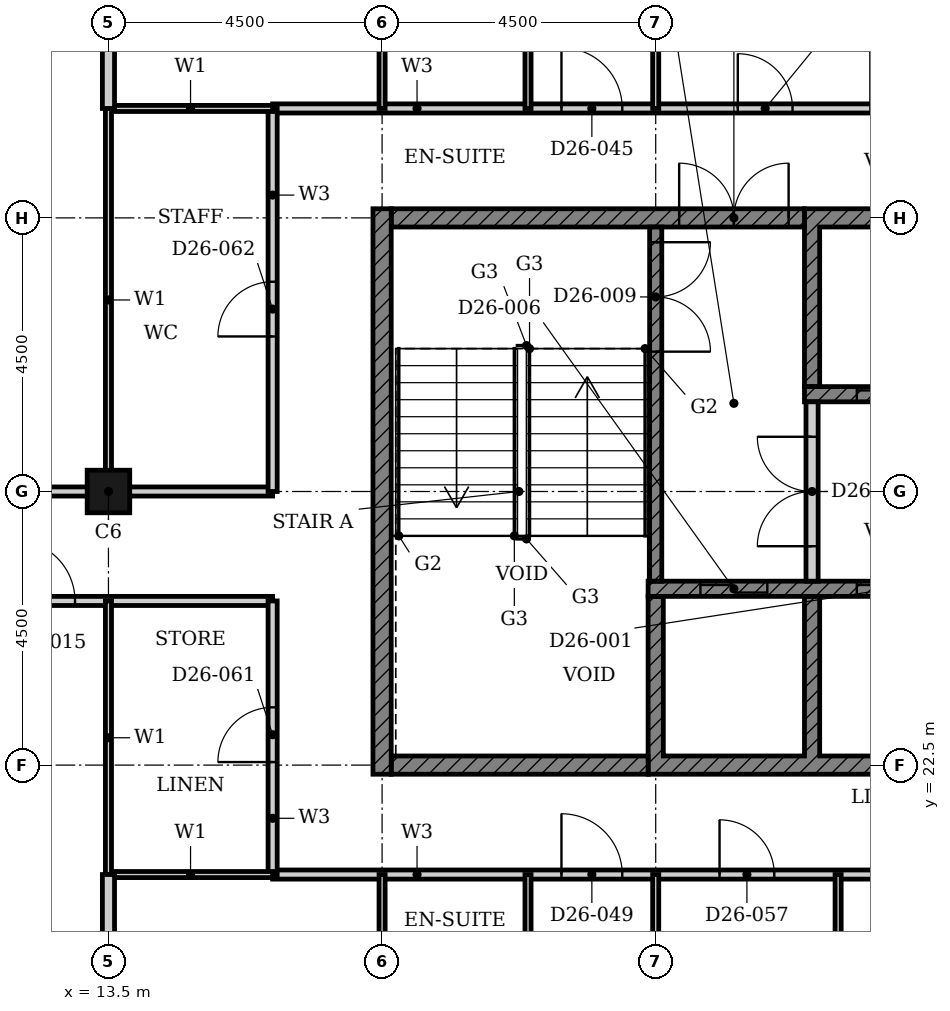
"""IFC4 building model, lengths in metres.
Left out: names, types, materials, properties, quantities, classifications, styles, units other than length and angle.
Written with IfcOpenShell. Run it as: python <this file> out.ifc"""

import sys

from ifc_helpers import new_model, si_unit, direction, frame, frame_2d, origin, origin_2d, place, context, subcontext, project, spatial, polyline, rectangle, hollow_rectangle, outline, extrude, element, fill, save


model = new_model("IFC4")
c1 = context("Model", 3, precision=1e-05, world=origin(), true_north=direction((0.0, 1.0)))
c2 = subcontext(c1, "Body", "Model", "MODEL_VIEW")
j1 = project(units=[si_unit("LENGTHUNIT", "METRE"), si_unit("PLANEANGLEUNIT", "RADIAN")], contexts=[c1])
p1 = place(None, origin())
s1 = spatial("IfcSite", under=j1, at=p1, CompositionType="ELEMENT")
p2 = place(p1, origin())
s2 = spatial("IfcBuilding", under=s1, at=p2, CompositionType="ELEMENT")
p3 = place(p2, frame((0.0, 0.0, 108.0)))
s3 = spatial("IfcBuildingStorey", under=s2, at=p3, CompositionType="ELEMENT", Elevation=108.0)
p4 = place(p3, frame((13.5, 27.0, 0.0), z_axis=(0.0, 0.0, 1.0), x_axis=(1.0, 0.0, 0.0)))
e1 = element("IfcColumn", 1, at=p4, inside=s3, PredefinedType="COLUMN", context=c2, shape_type="SweptSolid", body=[
    extrude(hollow_rectangle(XDim=0.7, YDim=0.7, WallThickness=0.022, at=origin_2d()), origin(), (0.0, 0.0, 1.0), 3.6),
])
p5 = place(p3, origin())
e2 = element("IfcWall", 2, at=p5, inside=s3, PredefinedType="SHEAR", context=c2, shape_type="SweptSolid", body=[
    extrude(outline(polyline([(22.375, 22.35), (38.053, 22.35), (38.053, 25.275), (37.803, 25.275), (37.803, 22.65), (35.482, 22.65), (35.482, 25.275), (35.232, 25.275), (35.232, 22.65), (32.911, 22.65), (32.911, 25.275), (32.661, 25.275), (32.661, 22.65), (30.339, 22.65), (30.339, 25.275), (30.089, 25.275), (30.089, 22.65), (27.768, 22.65), (27.768, 25.275), (27.518, 25.275), (27.518, 22.65), (25.197, 22.65), (25.197, 25.275), (24.947, 25.275), (24.947, 22.65), (22.625, 22.65), (22.625, 25.275), (22.375, 25.275), (22.375, 22.35)])), origin(), (0.0, 0.0, 1.0), 3.3),
])
p6 = place(p3, origin())
e3 = element("IfcWall", 3, at=p6, inside=s3, PredefinedType="SHEAR", context=c2, shape_type="SweptSolid", body=[
    extrude(outline(polyline([(24.947, 28.725), (25.197, 28.725), (25.197, 31.35), (27.518, 31.35), (27.518, 28.725), (27.768, 28.725), (27.768, 31.35), (30.089, 31.35), (30.089, 28.725), (30.339, 28.725), (30.339, 31.35), (32.661, 31.35), (32.661, 28.725), (32.911, 28.725), (32.911, 31.35), (35.232, 31.35), (35.232, 28.725), (35.482, 28.725), (35.482, 31.35), (37.803, 31.35), (37.803, 28.725), (38.053, 28.725), (38.053, 31.35), (40.375, 31.35), (40.375, 28.725), (40.625, 28.725), (40.625, 31.65), (24.947, 31.65), (24.947, 28.725)])), origin(), (0.0, 0.0, 1.0), 3.3),
])
p7 = place(p3, frame((18.15, 22.5, 0.0), z_axis=(0.0, 0.0, 1.0), x_axis=(1.0, 0.0, 0.0)))
e4 = element("IfcWall", 4, at=p7, inside=s3, PredefinedType="SHEAR", context=c2, shape_type="SweptSolid", body=[
    extrude(rectangle(XDim=4.225, YDim=0.3, at=frame_2d((2.113, 0.0))), origin(), (0.0, 0.0, 1.0), 3.3),
])
p8 = place(p3, frame((18.15, 31.5, 0.0), z_axis=(0.0, 0.0, 1.0), x_axis=(1.0, 0.0, 0.0)))
e5 = element("IfcWall", 5, at=p8, inside=s3, PredefinedType="SHEAR", context=c2, shape_type="SweptSolid", body=[
    extrude(rectangle(XDim=6.797, YDim=0.3, at=frame_2d((3.398, 0.0))), origin(), (0.0, 0.0, 1.0), 3.3),
])
p9 = place(p8, frame((4.736, 0.0, 0.0)))
e6 = element("IfcOpeningElement", 6, at=p9, cuts=e5, PredefinedType="OPENING", context=c2, shape_type="SweptSolid", body=[
    extrude(rectangle(XDim=1.8, YDim=2.1, at=frame_2d((0.9, 1.05))), frame((0.0, 0.16, 0.0), z_axis=(0.0, -1.0, 0.0), x_axis=(1.0, 0.0, 0.0)), (0.0, 0.0, 1.0), 0.32),
])
p10 = place(p3, frame((18.0, 22.35, 0.0), z_axis=(0.0, 0.0, 1.0), x_axis=(0.0, 1.0, 0.0)))
e7 = element("IfcWall", 7, at=p10, inside=s3, PredefinedType="SHEAR", context=c2, shape_type="SweptSolid", body=[
    extrude(rectangle(XDim=9.3, YDim=0.3, at=frame_2d((4.65, 0.0))), origin(), (0.0, 0.0, 1.0), 3.3),
])
p11 = place(p3, frame((22.375, 25.4, 0.0), z_axis=(0.0, 0.0, 1.0), x_axis=(1.0, 0.0, 0.0)))
e8 = element("IfcWall", 8, at=p11, inside=s3, PredefinedType="SHEAR", context=c2, shape_type="SweptSolid", body=[
    extrude(rectangle(XDim=15.678, YDim=0.25, at=frame_2d((7.839, 0.0))), origin(), (0.0, 0.0, 1.0), 3.3),
])
p12 = place(p11, frame((3.432, 0.0, 0.0)))
e9 = element("IfcOpeningElement", 9, at=p12, cuts=e8, PredefinedType="OPENING", context=c2, shape_type="SweptSolid", body=[
    extrude(rectangle(XDim=1.1, YDim=2.1, at=frame_2d((0.55, 1.05))), frame((0.0, 0.135, 0.0), z_axis=(0.0, -1.0, 0.0), x_axis=(1.0, 0.0, 0.0)), (0.0, 0.0, 1.0), 0.27),
])
p13 = place(p11, frame((11.146, 0.0, 0.0)))
e10 = element("IfcOpeningElement", 10, at=p13, cuts=e8, PredefinedType="OPENING", context=c2, shape_type="SweptSolid", body=[
    extrude(rectangle(XDim=1.1, YDim=2.1, at=frame_2d((0.55, 1.05))), frame((0.0, 0.135, 0.0), z_axis=(0.0, -1.0, 0.0), x_axis=(1.0, 0.0, 0.0)), (0.0, 0.0, 1.0), 0.27),
])
p14 = place(p11, frame((13.718, 0.0, 0.0)))
e11 = element("IfcOpeningElement", 11, at=p14, cuts=e8, PredefinedType="OPENING", context=c2, shape_type="SweptSolid", body=[
    extrude(rectangle(XDim=1.1, YDim=2.1, at=frame_2d((0.55, 1.05))), frame((0.0, 0.135, 0.0), z_axis=(0.0, -1.0, 0.0), x_axis=(1.0, 0.0, 0.0)), (0.0, 0.0, 1.0), 0.27),
])
p15 = place(p11, frame((0.861, 0.0, 0.0)))
e12 = element("IfcOpeningElement", 12, at=p15, cuts=e8, PredefinedType="OPENING", context=c2, shape_type="SweptSolid", body=[
    extrude(rectangle(XDim=1.1, YDim=2.1, at=frame_2d((0.55, 1.05))), frame((0.0, 0.135, 0.0), z_axis=(0.0, -1.0, 0.0), x_axis=(1.0, 0.0, 0.0)), (0.0, 0.0, 1.0), 0.27),
])
p16 = place(p3, frame((24.947, 28.6, 0.0), z_axis=(0.0, 0.0, 1.0), x_axis=(1.0, 0.0, 0.0)))
e13 = element("IfcWall", 13, at=p16, inside=s3, PredefinedType="SHEAR", context=c2, shape_type="SweptSolid", body=[
    extrude(rectangle(XDim=15.678, YDim=0.25, at=frame_2d((7.839, 0.0))), origin(), (0.0, 0.0, 1.0), 3.3),
])
p17 = place(p16, frame((0.861, 0.0, 0.0)))
e14 = element("IfcOpeningElement", 14, at=p17, cuts=e13, PredefinedType="OPENING", context=c2, shape_type="SweptSolid", body=[
    extrude(rectangle(XDim=1.1, YDim=2.1, at=frame_2d((0.55, 1.05))), frame((0.0, 0.135, 0.0), z_axis=(0.0, -1.0, 0.0), x_axis=(1.0, 0.0, 0.0)), (0.0, 0.0, 1.0), 0.27),
])
p18 = place(p16, frame((8.575, 0.0, 0.0)))
e15 = element("IfcOpeningElement", 15, at=p18, cuts=e13, PredefinedType="OPENING", context=c2, shape_type="SweptSolid", body=[
    extrude(rectangle(XDim=1.1, YDim=2.1, at=frame_2d((0.55, 1.05))), frame((0.0, 0.135, 0.0), z_axis=(0.0, -1.0, 0.0), x_axis=(1.0, 0.0, 0.0)), (0.0, 0.0, 1.0), 0.27),
])
p19 = place(p16, frame((13.718, 0.0, 0.0)))
e16 = element("IfcOpeningElement", 16, at=p19, cuts=e13, PredefinedType="OPENING", context=c2, shape_type="SweptSolid", body=[
    extrude(rectangle(XDim=1.1, YDim=2.1, at=frame_2d((0.55, 1.05))), frame((0.0, 0.135, 0.0), z_axis=(0.0, -1.0, 0.0), x_axis=(1.0, 0.0, 0.0)), (0.0, 0.0, 1.0), 0.27),
])
p20 = place(p3, frame((22.5, 31.35, 0.0), z_axis=(0.0, 0.0, 1.0), x_axis=(0.0, -1.0, 0.0)))
e17 = element("IfcWall", 17, at=p20, inside=s3, PredefinedType="SHEAR", context=c2, shape_type="SweptSolid", body=[
    extrude(rectangle(XDim=5.825, YDim=0.2, at=frame_2d((2.913, 0.0))), origin(), (0.0, 0.0, 1.0), 3.3),
])
p21 = place(p20, frame((0.25, 0.0, 0.0)))
e18 = element("IfcOpeningElement", 18, at=p21, cuts=e17, PredefinedType="OPENING", context=c2, shape_type="SweptSolid", body=[
    extrude(rectangle(XDim=1.8, YDim=2.1, at=frame_2d((0.9, 1.05))), frame((0.0, 0.11, 0.0), z_axis=(0.0, -1.0, 0.0), x_axis=(1.0, 0.0, 0.0)), (0.0, 0.0, 1.0), 0.22),
])
p22 = place(p3, frame((25.072, 25.525, 0.0), z_axis=(0.0, 0.0, 1.0), x_axis=(0.0, 1.0, 0.0)))
e19 = element("IfcWall", 19, at=p22, inside=s3, PredefinedType="PARTITIONING", context=c2, shape_type="SweptSolid", body=[
    extrude(rectangle(XDim=2.95, YDim=0.2, at=frame_2d((1.475, 0.0))), origin(), (0.0, 0.0, 1.0), 3.3),
])
p23 = place(p22, frame((0.575, 0.0, 0.0)))
e20 = element("IfcOpeningElement", 20, at=p23, cuts=e19, PredefinedType="OPENING", context=c2, shape_type="SweptSolid", body=[
    extrude(rectangle(XDim=1.8, YDim=2.1, at=frame_2d((0.9, 1.05))), frame((0.0, 0.11, 0.0), z_axis=(0.0, -1.0, 0.0), x_axis=(1.0, 0.0, 0.0)), (0.0, 0.0, 1.0), 0.22),
])
p24 = place(p3, frame((16.2, 20.7, 0.0), z_axis=(0.0, 0.0, 1.0), x_axis=(1.0, 0.0, 0.0)))
e21 = element("IfcWall", 21, at=p24, inside=s3, PredefinedType="PARTITIONING", context=c2, shape_type="SweptSolid", body=[
    extrude(rectangle(XDim=13.5, YDim=0.15, at=frame_2d((6.75, 0.0))), origin(), (0.0, 0.0, 1.0), 3.3),
])
p25 = place(p24, frame((4.75, 0.0, 0.0)))
e22 = element("IfcOpeningElement", 22, at=p25, cuts=e21, PredefinedType="OPENING", context=c2, shape_type="SweptSolid", body=[
    extrude(rectangle(XDim=1.0, YDim=2.1, at=frame_2d((0.5, 1.05))), frame((0.0, 0.085, 0.0), z_axis=(0.0, -1.0, 0.0), x_axis=(1.0, 0.0, 0.0)), (0.0, 0.0, 1.0), 0.17),
])
p26 = place(p24, frame((7.35, 0.0, 0.0)))
e23 = element("IfcOpeningElement", 23, at=p26, cuts=e21, PredefinedType="OPENING", context=c2, shape_type="SweptSolid", body=[
    extrude(rectangle(XDim=0.9, YDim=2.1, at=frame_2d((0.45, 1.05))), frame((0.0, 0.085, 0.0), z_axis=(0.0, -1.0, 0.0), x_axis=(1.0, 0.0, 0.0)), (0.0, 0.0, 1.0), 0.17),
])
p27 = place(p24, frame((10.95, 0.0, 0.0)))
e24 = element("IfcOpeningElement", 24, at=p27, cuts=e21, PredefinedType="OPENING", context=c2, shape_type="SweptSolid", body=[
    extrude(rectangle(XDim=0.9, YDim=2.1, at=frame_2d((0.45, 1.05))), frame((0.0, 0.085, 0.0), z_axis=(0.0, -1.0, 0.0), x_axis=(1.0, 0.0, 0.0)), (0.0, 0.0, 1.0), 0.17),
])
p28 = place(p3, frame((4.5, 25.2, 0.0), z_axis=(0.0, 0.0, 1.0), x_axis=(1.0, 0.0, 0.0)))
e25 = element("IfcWall", 25, at=p28, inside=s3, PredefinedType="PARTITIONING", context=c2, shape_type="SweptSolid", body=[
    extrude(rectangle(XDim=11.7, YDim=0.15, at=frame_2d((5.85, 0.0))), origin(), (0.0, 0.0, 1.0), 3.3),
])
p29 = place(p28, frame((7.45, 0.0, 0.0)))
e26 = element("IfcOpeningElement", 26, at=p29, cuts=e25, PredefinedType="OPENING", context=c2, shape_type="SweptSolid", body=[
    extrude(rectangle(XDim=1.0, YDim=2.1, at=frame_2d((0.5, 1.05))), frame((0.0, 0.085, 0.0), z_axis=(0.0, -1.0, 0.0), x_axis=(1.0, 0.0, 0.0)), (0.0, 0.0, 1.0), 0.17),
])
p30 = place(p28, frame((2.95, 0.0, 0.0)))
e27 = element("IfcOpeningElement", 27, at=p30, cuts=e25, PredefinedType="OPENING", context=c2, shape_type="SweptSolid", body=[
    extrude(rectangle(XDim=1.0, YDim=2.1, at=frame_2d((0.5, 1.05))), frame((0.0, 0.085, 0.0), z_axis=(0.0, -1.0, 0.0), x_axis=(1.0, 0.0, 0.0)), (0.0, 0.0, 1.0), 0.17),
])
p31 = place(p3, frame((4.5, 27.0, 0.0), z_axis=(0.0, 0.0, 1.0), x_axis=(1.0, 0.0, 0.0)))
e28 = element("IfcWall", 28, at=p31, inside=s3, PredefinedType="PARTITIONING", context=c2, shape_type="SweptSolid", body=[
    extrude(rectangle(XDim=11.7, YDim=0.15, at=frame_2d((5.85, 0.0))), origin(), (0.0, 0.0, 1.0), 2.58),
])
p32 = place(p31, frame((6.25, 0.0, 0.0)))
e29 = element("IfcOpeningElement", 29, at=p32, cuts=e28, PredefinedType="OPENING", context=c2, shape_type="SweptSolid", body=[
    extrude(rectangle(XDim=1.0, YDim=2.1, at=frame_2d((0.5, 1.05))), frame((0.0, 0.085, 0.0), z_axis=(0.0, -1.0, 0.0), x_axis=(1.0, 0.0, 0.0)), (0.0, 0.0, 1.0), 0.17),
])
p33 = place(p3, frame((16.2, 33.3, 0.0), z_axis=(0.0, 0.0, 1.0), x_axis=(1.0, 0.0, 0.0)))
e30 = element("IfcWall", 30, at=p33, inside=s3, PredefinedType="PARTITIONING", context=c2, shape_type="SweptSolid", body=[
    extrude(rectangle(XDim=15.3, YDim=0.15, at=frame_2d((7.65, 0.0))), origin(), (0.0, 0.0, 1.0), 3.3),
])
p34 = place(p33, frame((4.75, 0.0, 0.0)))
e31 = element("IfcOpeningElement", 31, at=p34, cuts=e30, PredefinedType="OPENING", context=c2, shape_type="SweptSolid", body=[
    extrude(rectangle(XDim=1.0, YDim=2.1, at=frame_2d((0.5, 1.05))), frame((0.0, 0.085, 0.0), z_axis=(0.0, -1.0, 0.0), x_axis=(1.0, 0.0, 0.0)), (0.0, 0.0, 1.0), 0.17),
])
p35 = place(p33, frame((7.65, 0.0, 0.0)))
e32 = element("IfcOpeningElement", 32, at=p35, cuts=e30, PredefinedType="OPENING", context=c2, shape_type="SweptSolid", body=[
    extrude(rectangle(XDim=0.9, YDim=2.1, at=frame_2d((0.45, 1.05))), frame((0.0, 0.085, 0.0), z_axis=(0.0, -1.0, 0.0), x_axis=(1.0, 0.0, 0.0)), (0.0, 0.0, 1.0), 0.17),
])
p36 = place(p33, frame((12.15, 0.0, 0.0)))
e33 = element("IfcOpeningElement", 33, at=p36, cuts=e30, PredefinedType="OPENING", context=c2, shape_type="SweptSolid", body=[
    extrude(rectangle(XDim=0.9, YDim=2.1, at=frame_2d((0.45, 1.05))), frame((0.0, 0.085, 0.0), z_axis=(0.0, -1.0, 0.0), x_axis=(1.0, 0.0, 0.0)), (0.0, 0.0, 1.0), 0.17),
])
p37 = place(p3, frame((16.2, 27.0, 0.0), z_axis=(0.0, 0.0, 1.0), x_axis=(0.0, 1.0, 0.0)))
e34 = element("IfcWall", 34, at=p37, inside=s3, PredefinedType="PARTITIONING", context=c2, shape_type="SweptSolid", body=[
    extrude(rectangle(XDim=6.3, YDim=0.15, at=frame_2d((3.15, 0.0))), origin(), (0.0, 0.0, 1.0), 3.3),
])
p38 = place(p37, frame((2.55, 0.0, 0.0)))
e35 = element("IfcOpeningElement", 35, at=p38, cuts=e34, PredefinedType="OPENING", context=c2, shape_type="SweptSolid", body=[
    extrude(rectangle(XDim=0.9, YDim=2.1, at=frame_2d((0.45, 1.05))), frame((0.0, 0.085, 0.0), z_axis=(0.0, -1.0, 0.0), x_axis=(1.0, 0.0, 0.0)), (0.0, 0.0, 1.0), 0.17),
])
p39 = place(p3, frame((16.2, 20.7, 0.0), z_axis=(0.0, 0.0, 1.0), x_axis=(0.0, 1.0, 0.0)))
e36 = element("IfcWall", 36, at=p39, inside=s3, PredefinedType="PARTITIONING", context=c2, shape_type="SweptSolid", body=[
    extrude(rectangle(XDim=4.5, YDim=0.15, at=frame_2d((2.25, 0.0))), origin(), (0.0, 0.0, 1.0), 3.3),
])
p40 = place(p39, frame((1.85, 0.0, 0.0)))
e37 = element("IfcOpeningElement", 37, at=p40, cuts=e36, PredefinedType="OPENING", context=c2, shape_type="SweptSolid", body=[
    extrude(rectangle(XDim=0.9, YDim=2.1, at=frame_2d((0.45, 1.05))), frame((0.0, 0.085, 0.0), z_axis=(0.0, -1.0, 0.0), x_axis=(1.0, 0.0, 0.0)), (0.0, 0.0, 1.0), 0.17),
])
for number, where, z_axis, x_axis in (
    (38, (13.5, 20.7, 0.0), (0.0, 0.0, 1.0), (1.0, 0.0, 0.0)),
    (39, (13.5, 33.3, 0.0), (0.0, 0.0, 1.0), (1.0, 0.0, 0.0)),
):
    element("IfcWall", number, at=place(p3, frame(where, z_axis=z_axis, x_axis=x_axis)), inside=s3, PredefinedType="PARTITIONING", context=c2, shape_type="SweptSolid", body=[
        extrude(rectangle(XDim=2.7, YDim=0.1, at=frame_2d((1.35, 0.0))), origin(), (0.0, 0.0, 1.0), 3.3),
    ])
p41 = place(p3, frame((13.5, 20.7, 0.0), z_axis=(0.0, 0.0, 1.0), x_axis=(0.0, 1.0, 0.0)))
e40 = element("IfcWall", 40, at=p41, inside=s3, PredefinedType="PARTITIONING", context=c2, shape_type="SweptSolid", body=[
    extrude(rectangle(XDim=4.5, YDim=0.1, at=frame_2d((2.25, 0.0))), origin(), (0.0, 0.0, 1.0), 2.38),
])
p42 = place(p3, frame((13.5, 27.0, 0.0), z_axis=(0.0, 0.0, 1.0), x_axis=(0.0, 1.0, 0.0)))
e41 = element("IfcWall", 41, at=p42, inside=s3, PredefinedType="PARTITIONING", context=c2, shape_type="SweptSolid", body=[
    extrude(rectangle(XDim=6.3, YDim=0.1, at=frame_2d((3.15, 0.0))), origin(), (0.0, 0.0, 1.0), 2.38),
])
for number, where, z_axis, x_axis in (
    (42, (22.5, 33.3, 0.0), (0.0, 0.0, 1.0), (0.0, 1.0, 0.0)),
    (43, (22.5, 13.31, 0.0), (0.0, 0.0, 1.0), (0.0, 1.0, 0.0)),
):
    element("IfcWall", number, at=place(p3, frame(where, z_axis=z_axis, x_axis=x_axis)), inside=s3, PredefinedType="PARTITIONING", context=c2, shape_type="SweptSolid", body=[
        extrude(rectangle(XDim=7.39, YDim=0.1, at=frame_2d((3.695, 0.0))), origin(), (0.0, 0.0, 1.0), 3.3),
    ])
p43 = place(p3, frame((25.5, 13.5, 0.0), z_axis=(0.0, 0.0, 1.0), x_axis=(0.0, 1.0, 0.0)))
e44 = element("IfcWall", 44, at=p43, inside=s3, PredefinedType="PARTITIONING", context=c2, shape_type="SweptSolid", body=[
    extrude(rectangle(XDim=7.2, YDim=0.1, at=frame_2d((3.6, 0.0))), origin(), (0.0, 0.0, 1.0), 3.3),
])
for number, where, z_axis, x_axis in (
    (45, (13.5, 17.81, 0.0), (0.0, 0.0, 1.0), (0.0, 1.0, 0.0)),
    (46, (13.5, 33.3, 0.0), (0.0, 0.0, 1.0), (0.0, 1.0, 0.0)),
):
    element("IfcWall", number, at=place(p3, frame(where, z_axis=z_axis, x_axis=x_axis)), inside=s3, PredefinedType="PARTITIONING", context=c2, shape_type="SweptSolid", body=[
        extrude(rectangle(XDim=2.89, YDim=0.2, at=frame_2d((1.445, 0.0))), origin(), (0.0, 0.0, 1.0), 2.38),
    ])
for number, where, z_axis, x_axis in (
    (47, (18.0, 33.3, 0.0), (0.0, 0.0, 1.0), (0.0, 1.0, 0.0)),
    (48, (18.0, 18.0, 0.0), (0.0, 0.0, 1.0), (0.0, 1.0, 0.0)),
    (49, (20.4, 33.3, 0.0), (0.0, 0.0, 1.0), (0.0, 1.0, 0.0)),
    (50, (20.4, 18.0, 0.0), (0.0, 0.0, 1.0), (0.0, 1.0, 0.0)),
):
    element("IfcWall", number, at=place(p3, frame(where, z_axis=z_axis, x_axis=x_axis)), inside=s3, PredefinedType="PARTITIONING", context=c2, shape_type="SweptSolid", body=[
        extrude(rectangle(XDim=2.7, YDim=0.1, at=frame_2d((1.35, 0.0))), origin(), (0.0, 0.0, 1.0), 3.3),
    ])
p44 = place(p12, origin())
e51 = element("IfcDoor", 51, at=p44, inside=s3, OperationType="DOUBLE_DOOR_SLIDING", PredefinedType="DOOR", context=c2, shape_type="SweptSolid", body=[
    extrude(rectangle(XDim=1.1, YDim=2.1, at=frame_2d((0.55, 1.05))), frame((0.0, 0.025, 0.0), z_axis=(0.0, -1.0, 0.0), x_axis=(1.0, 0.0, 0.0)), (0.0, 0.0, 1.0), 0.05),
])
fill(e9, e51)
p45 = place(p17, origin())
e52 = element("IfcDoor", 52, at=p45, inside=s3, OperationType="DOUBLE_DOOR_SLIDING", PredefinedType="DOOR", context=c2, shape_type="SweptSolid", body=[
    extrude(rectangle(XDim=1.1, YDim=2.1, at=frame_2d((0.55, 1.05))), frame((0.0, 0.025, 0.0), z_axis=(0.0, -1.0, 0.0), x_axis=(1.0, 0.0, 0.0)), (0.0, 0.0, 1.0), 0.05),
])
fill(e14, e52)
p46 = place(p15, origin())
e53 = element("IfcDoor", 53, at=p46, inside=s3, OperationType="DOUBLE_DOOR_SLIDING", PredefinedType="DOOR", context=c2, shape_type="SweptSolid", body=[
    extrude(rectangle(XDim=1.1, YDim=2.1, at=frame_2d((0.55, 1.05))), frame((0.0, 0.025, 0.0), z_axis=(0.0, -1.0, 0.0), x_axis=(1.0, 0.0, 0.0)), (0.0, 0.0, 1.0), 0.05),
])
fill(e12, e53)
p47 = place(p21, origin())
e54 = element("IfcDoor", 54, at=p47, inside=s3, OperationType="DOUBLE_DOOR_SINGLE_SWING", PredefinedType="DOOR", context=c2, shape_type="SweptSolid", body=[
    extrude(rectangle(XDim=1.8, YDim=2.1, at=frame_2d((0.9, 1.05))), frame((0.0, 0.025, 0.0), z_axis=(0.0, -1.0, 0.0), x_axis=(1.0, 0.0, 0.0)), (0.0, 0.0, 1.0), 0.05),
])
fill(e18, e54)
p48 = place(p23, origin())
e55 = element("IfcDoor", 55, at=p48, inside=s3, OperationType="DOUBLE_DOOR_SINGLE_SWING", PredefinedType="DOOR", context=c2, shape_type="SweptSolid", body=[
    extrude(rectangle(XDim=1.8, YDim=2.1, at=frame_2d((0.9, 1.05))), frame((0.0, 0.025, 0.0), z_axis=(0.0, -1.0, 0.0), x_axis=(1.0, 0.0, 0.0)), (0.0, 0.0, 1.0), 0.05),
])
fill(e20, e55)
p49 = place(p9, origin())
e56 = element("IfcDoor", 56, at=p49, inside=s3, OperationType="DOUBLE_DOOR_SINGLE_SWING", PredefinedType="DOOR", context=c2, shape_type="SweptSolid", body=[
    extrude(rectangle(XDim=1.8, YDim=2.1, at=frame_2d((0.9, 1.05))), frame((0.0, 0.025, 0.0), z_axis=(0.0, -1.0, 0.0), x_axis=(1.0, 0.0, 0.0)), (0.0, 0.0, 1.0), 0.05),
])
fill(e6, e56)
p50 = place(p29, origin())
e57 = element("IfcDoor", 57, at=p50, inside=s3, OperationType="SINGLE_SWING_RIGHT", PredefinedType="DOOR", context=c2, shape_type="SweptSolid", body=[
    extrude(rectangle(XDim=1.0, YDim=2.1, at=frame_2d((0.5, 1.05))), frame((0.0, 0.025, 0.0), z_axis=(0.0, -1.0, 0.0), x_axis=(1.0, 0.0, 0.0)), (0.0, 0.0, 1.0), 0.05),
])
fill(e26, e57)
p51 = place(p34, origin())
e58 = element("IfcDoor", 58, at=p51, inside=s3, OperationType="SINGLE_SWING_RIGHT", PredefinedType="DOOR", context=c2, shape_type="SweptSolid", body=[
    extrude(rectangle(XDim=1.0, YDim=2.1, at=frame_2d((0.5, 1.05))), frame((0.0, 0.025, 0.0), z_axis=(0.0, -1.0, 0.0), x_axis=(1.0, 0.0, 0.0)), (0.0, 0.0, 1.0), 0.05),
])
fill(e31, e58)
p52 = place(p25, origin())
e59 = element("IfcDoor", 59, at=p52, inside=s3, OperationType="SINGLE_SWING_RIGHT", PredefinedType="DOOR", context=c2, shape_type="SweptSolid", body=[
    extrude(rectangle(XDim=1.0, YDim=2.1, at=frame_2d((0.5, 1.05))), frame((0.0, 0.025, 0.0), z_axis=(0.0, -1.0, 0.0), x_axis=(1.0, 0.0, 0.0)), (0.0, 0.0, 1.0), 0.05),
])
fill(e22, e59)
p53 = place(p35, origin())
e60 = element("IfcDoor", 60, at=p53, inside=s3, OperationType="SINGLE_SWING_LEFT", PredefinedType="DOOR", context=c2, shape_type="SweptSolid", body=[
    extrude(rectangle(XDim=0.9, YDim=2.1, at=frame_2d((0.45, 1.05))), frame((0.0, 0.025, 0.0), z_axis=(0.0, -1.0, 0.0), x_axis=(1.0, 0.0, 0.0)), (0.0, 0.0, 1.0), 0.05),
])
fill(e32, e60)
p54 = place(p26, origin())
e61 = element("IfcDoor", 61, at=p54, inside=s3, OperationType="SINGLE_SWING_LEFT", PredefinedType="DOOR", context=c2, shape_type="SweptSolid", body=[
    extrude(rectangle(XDim=0.9, YDim=2.1, at=frame_2d((0.45, 1.05))), frame((0.0, 0.025, 0.0), z_axis=(0.0, -1.0, 0.0), x_axis=(1.0, 0.0, 0.0)), (0.0, 0.0, 1.0), 0.05),
])
fill(e23, e61)
p55 = place(p40, origin())
e62 = element("IfcDoor", 62, at=p55, inside=s3, OperationType="SINGLE_SWING_RIGHT", PredefinedType="DOOR", context=c2, shape_type="SweptSolid", body=[
    extrude(rectangle(XDim=0.9, YDim=2.1, at=frame_2d((0.45, 1.05))), frame((0.0, 0.025, 0.0), z_axis=(0.0, -1.0, 0.0), x_axis=(1.0, 0.0, 0.0)), (0.0, 0.0, 1.0), 0.05),
])
fill(e37, e62)
p56 = place(p38, origin())
e63 = element("IfcDoor", 63, at=p56, inside=s3, OperationType="SINGLE_SWING_LEFT", PredefinedType="DOOR", context=c2, shape_type="SweptSolid", body=[
    extrude(rectangle(XDim=0.9, YDim=2.1, at=frame_2d((0.45, 1.05))), frame((0.0, 0.025, 0.0), z_axis=(0.0, -1.0, 0.0), x_axis=(1.0, 0.0, 0.0)), (0.0, 0.0, 1.0), 0.05),
])
fill(e35, e63)
save(model, sys.argv[1])
